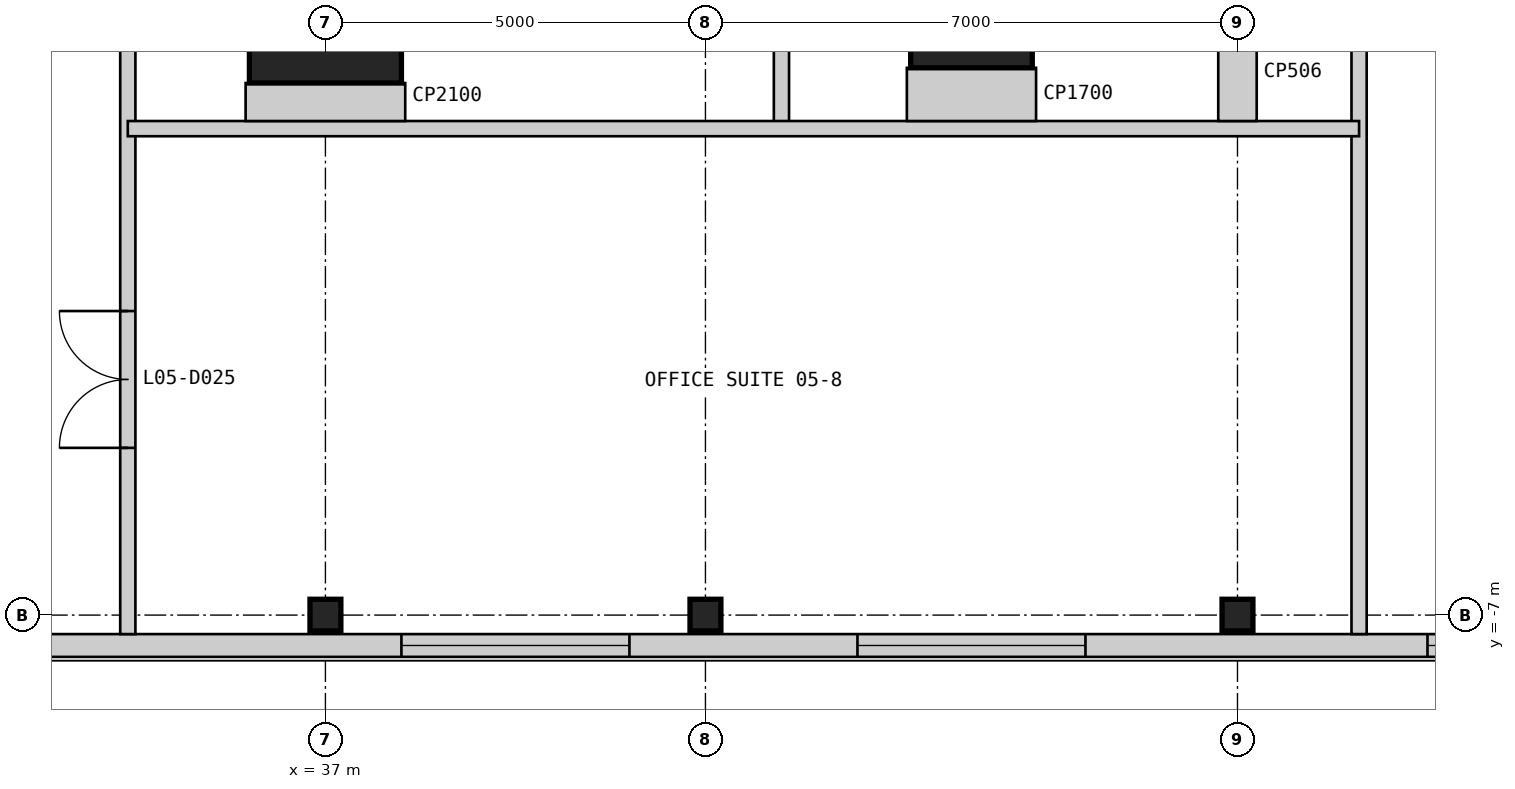
"""IFC4 building model, lengths in metres.
Left out: names, types, materials, properties, quantities, classifications, styles, units other than length and angle.
Written with IfcOpenShell. Run it as: python <this file> out.ifc"""

import sys

from ifc_helpers import new_model, si_unit, direction, frame, frame_2d, origin, origin_2d, place, context, subcontext, project, spatial, rectangle, i_section, extrude, element, fill, save


model = new_model("IFC4")
c1 = context("Model", 3, precision=1e-05, world=origin(), true_north=direction((0.0, 1.0)))
c2 = subcontext(c1, "Body", "Model", "MODEL_VIEW")
j1 = project(units=[si_unit("LENGTHUNIT", "METRE"), si_unit("PLANEANGLEUNIT", "RADIAN")], contexts=[c1])
p1 = place(None, origin())
s1 = spatial("IfcSite", under=j1, at=p1, CompositionType="ELEMENT")
p2 = place(p1, origin())
s2 = spatial("IfcBuilding", under=s1, at=p2, CompositionType="ELEMENT")
p3 = place(p2, frame((0.0, 0.0, 26.2)))
s3 = spatial("IfcBuildingStorey", under=s2, at=p3, CompositionType="ELEMENT", Elevation=26.2)
p4 = place(p3, frame((37.0, 1.0, 0.0), z_axis=(0.0, 0.0, 1.0), x_axis=(1.0, 0.0, 0.0)))
e1 = element("IfcColumn", 1, at=p4, inside=s3, PredefinedType="COLUMN", context=c2, shape_type="SweptSolid", body=[
    extrude(rectangle(XDim=2.0, YDim=2.0, at=origin_2d()), origin(), (0.0, 0.0, 1.0), 4.8),
])
p5 = place(p3, frame((45.5, 1.0, 0.0), z_axis=(0.0, 0.0, 1.0), x_axis=(1.0, 0.0, 0.0)))
e2 = element("IfcColumn", 2, at=p5, inside=s3, PredefinedType="COLUMN", context=c2, shape_type="SweptSolid", body=[
    extrude(rectangle(XDim=1.6, YDim=1.6, at=origin_2d()), origin(), (0.0, 0.0, 1.0), 4.8),
])
for number, where, z_axis, x_axis in (
    (3, (37.0, -7.0, 0.0), (0.0, 0.0, 1.0), (1.0, 0.0, 0.0)),
    (4, (42.0, -7.0, 0.0), (0.0, 0.0, 1.0), (1.0, 0.0, 0.0)),
    (5, (49.0, -7.0, 0.0), (0.0, 0.0, 1.0), (1.0, 0.0, 0.0)),
):
    element("IfcColumn", number, at=place(p3, frame(where, z_axis=z_axis, x_axis=x_axis)), inside=s3, PredefinedType="COLUMN", context=c2, shape_type="SweptSolid", body=[
        extrude(i_section(OverallWidth=0.406, OverallDepth=0.417, WebThickness=0.03, FlangeThickness=0.048, at=origin_2d()), origin(), (0.0, 0.0, 1.0), 4.8),
    ])
p6 = place(p3, frame((-7.55, -7.4, 0.0), z_axis=(0.0, 0.0, 1.0), x_axis=(1.0, 0.0, 0.0)))
e6 = element("IfcWall", 6, at=p6, inside=s3, PredefinedType="SOLIDWALL", context=c2, shape_type="SweptSolid", body=[
    extrude(rectangle(XDim=65.1, YDim=0.3, at=frame_2d((32.55, 0.0))), origin(), (0.0, 0.0, 1.0), 4.5),
])
p7 = place(p6, frame((3.05, 0.0, 0.9)))
e7 = element("IfcOpeningElement", 7, at=p7, cuts=e6, PredefinedType="OPENING", context=c2, shape_type="SweptSolid", body=[
    extrude(rectangle(XDim=3.0, YDim=2.4, at=frame_2d((1.5, 1.2))), frame((0.0, 0.16, 0.0), z_axis=(0.0, -1.0, 0.0), x_axis=(1.0, 0.0, 0.0)), (0.0, 0.0, 1.0), 0.32),
])
p8 = place(p6, frame((11.05, 0.0, 0.9)))
e8 = element("IfcOpeningElement", 8, at=p8, cuts=e6, PredefinedType="OPENING", context=c2, shape_type="SweptSolid", body=[
    extrude(rectangle(XDim=3.0, YDim=2.4, at=frame_2d((1.5, 1.2))), frame((0.0, 0.16, 0.0), z_axis=(0.0, -1.0, 0.0), x_axis=(1.0, 0.0, 0.0)), (0.0, 0.0, 1.0), 0.32),
])
p9 = place(p6, frame((25.05, 0.0, 0.9)))
e9 = element("IfcOpeningElement", 9, at=p9, cuts=e6, PredefinedType="OPENING", context=c2, shape_type="SweptSolid", body=[
    extrude(rectangle(XDim=3.0, YDim=2.4, at=frame_2d((1.5, 1.2))), frame((0.0, 0.16, 0.0), z_axis=(0.0, -1.0, 0.0), x_axis=(1.0, 0.0, 0.0)), (0.0, 0.0, 1.0), 0.32),
])
p10 = place(p6, frame((37.05, 0.0, 0.9)))
e10 = element("IfcOpeningElement", 10, at=p10, cuts=e6, PredefinedType="OPENING", context=c2, shape_type="SweptSolid", body=[
    extrude(rectangle(XDim=3.0, YDim=2.4, at=frame_2d((1.5, 1.2))), frame((0.0, 0.16, 0.0), z_axis=(0.0, -1.0, 0.0), x_axis=(1.0, 0.0, 0.0)), (0.0, 0.0, 1.0), 0.32),
])
p11 = place(p6, frame((45.55, 0.0, 0.9)))
e11 = element("IfcOpeningElement", 11, at=p11, cuts=e6, PredefinedType="OPENING", context=c2, shape_type="SweptSolid", body=[
    extrude(rectangle(XDim=3.0, YDim=2.4, at=frame_2d((1.5, 1.2))), frame((0.0, 0.16, 0.0), z_axis=(0.0, -1.0, 0.0), x_axis=(1.0, 0.0, 0.0)), (0.0, 0.0, 1.0), 0.32),
])
p12 = place(p6, frame((51.55, 0.0, 0.9)))
e12 = element("IfcOpeningElement", 12, at=p12, cuts=e6, PredefinedType="OPENING", context=c2, shape_type="SweptSolid", body=[
    extrude(rectangle(XDim=3.0, YDim=2.4, at=frame_2d((1.5, 1.2))), frame((0.0, 0.16, 0.0), z_axis=(0.0, -1.0, 0.0), x_axis=(1.0, 0.0, 0.0)), (0.0, 0.0, 1.0), 0.32),
])
p13 = place(p6, frame((59.05, 0.0, 0.9)))
e13 = element("IfcOpeningElement", 13, at=p13, cuts=e6, PredefinedType="OPENING", context=c2, shape_type="SweptSolid", body=[
    extrude(rectangle(XDim=3.0, YDim=2.4, at=frame_2d((1.5, 1.2))), frame((0.0, 0.16, 0.0), z_axis=(0.0, -1.0, 0.0), x_axis=(1.0, 0.0, 0.0)), (0.0, 0.0, 1.0), 0.32),
])
p14 = place(p3, frame((34.4, -7.25, 0.0), z_axis=(0.0, 0.0, 1.0), x_axis=(0.0, 1.0, 0.0)))
e14 = element("IfcWall", 14, at=p14, inside=s3, PredefinedType="PARTITIONING", context=c2, shape_type="SweptSolid", body=[
    extrude(rectangle(XDim=14.25, YDim=0.2, at=frame_2d((7.125, 0.0))), origin(), (0.0, 0.0, 1.0), 4.5),
])
p15 = place(p14, frame((2.45, 0.0, 0.0)))
e15 = element("IfcOpeningElement", 15, at=p15, cuts=e14, PredefinedType="OPENING", context=c2, shape_type="SweptSolid", body=[
    extrude(rectangle(XDim=1.8, YDim=2.4, at=frame_2d((0.9, 1.2))), frame((0.0, 0.11, 0.0), z_axis=(0.0, -1.0, 0.0), x_axis=(1.0, 0.0, 0.0)), (0.0, 0.0, 1.0), 0.22),
])
p16 = place(p14, frame((9.525, 0.0, 0.0)))
e16 = element("IfcOpeningElement", 16, at=p16, cuts=e14, PredefinedType="OPENING", context=c2, shape_type="SweptSolid", body=[
    extrude(rectangle(XDim=1.8, YDim=2.4, at=frame_2d((0.9, 1.2))), frame((0.0, 0.11, 0.0), z_axis=(0.0, -1.0, 0.0), x_axis=(1.0, 0.0, 0.0)), (0.0, 0.0, 1.0), 0.22),
])
p17 = place(p3, frame((43.0, -0.6, 0.0), z_axis=(0.0, 0.0, 1.0), x_axis=(0.0, 1.0, 0.0)))
e17 = element("IfcWall", 17, at=p17, inside=s3, PredefinedType="PARTITIONING", context=c2, shape_type="SweptSolid", body=[
    extrude(rectangle(XDim=28.6, YDim=0.2, at=frame_2d((14.3, 0.0))), origin(), (0.0, 0.0, 1.0), 3.893),
])
p18 = place(p3, frame((50.6, -7.25, 0.0), z_axis=(0.0, 0.0, 1.0), x_axis=(0.0, 1.0, 0.0)))
e18 = element("IfcWall", 18, at=p18, inside=s3, PredefinedType="PARTITIONING", context=c2, shape_type="SweptSolid", body=[
    extrude(rectangle(XDim=22.85, YDim=0.2, at=frame_2d((11.425, 0.0))), origin(), (0.0, 0.0, 1.0), 4.5),
])
p19 = place(p3, frame((34.4, -0.6, 0.0), z_axis=(0.0, 0.0, 1.0), x_axis=(1.0, 0.0, 0.0)))
e19 = element("IfcWall", 19, at=p19, inside=s3, PredefinedType="PARTITIONING", context=c2, shape_type="SweptSolid", body=[
    extrude(rectangle(XDim=16.2, YDim=0.2, at=frame_2d((8.1, 0.0))), origin(), (0.0, 0.0, 1.0), 4.5),
])
p20 = place(p3, frame((37.0, -0.5, 0.0), z_axis=(0.0, 0.0, 1.0), x_axis=(0.0, 1.0, 0.0)))
e20 = element("IfcWall", 20, at=p20, inside=s3, PredefinedType="PARTITIONING", context=c2, shape_type="SweptSolid", body=[
    extrude(rectangle(XDim=0.5, YDim=2.1, at=frame_2d((0.25, 0.0))), origin(), (0.0, 0.0, 1.0), 4.5),
])
p21 = place(p3, frame((45.5, -0.5, 0.0), z_axis=(0.0, 0.0, 1.0), x_axis=(0.0, 1.0, 0.0)))
e21 = element("IfcWall", 21, at=p21, inside=s3, PredefinedType="PARTITIONING", context=c2, shape_type="SweptSolid", body=[
    extrude(rectangle(XDim=0.7, YDim=1.7, at=frame_2d((0.35, 0.0))), origin(), (0.0, 0.0, 1.0), 4.5),
])
p22 = place(p3, frame((49.0, -0.5, 0.0), z_axis=(0.0, 0.0, 1.0), x_axis=(0.0, 1.0, 0.0)))
e22 = element("IfcWall", 22, at=p22, inside=s3, PredefinedType="PARTITIONING", context=c2, shape_type="SweptSolid", body=[
    extrude(rectangle(XDim=1.292, YDim=0.506, at=frame_2d((0.646, 0.0))), origin(), (0.0, 0.0, 1.0), 3.654),
])
p23 = place(p11, origin())
e23 = element("IfcWindow", 23, at=p23, inside=s3, PartitioningType="SINGLE_PANEL", PredefinedType="WINDOW", context=c2, shape_type="SweptSolid", body=[
    extrude(rectangle(XDim=3.0, YDim=2.4, at=frame_2d((1.5, 1.2))), frame((0.0, 0.03, 0.0), z_axis=(0.0, -1.0, 0.0), x_axis=(1.0, 0.0, 0.0)), (0.0, 0.0, 1.0), 0.06),
])
fill(e11, e23)
p24 = place(p12, origin())
e24 = element("IfcWindow", 24, at=p24, inside=s3, PartitioningType="SINGLE_PANEL", PredefinedType="WINDOW", context=c2, shape_type="SweptSolid", body=[
    extrude(rectangle(XDim=3.0, YDim=2.4, at=frame_2d((1.5, 1.2))), frame((0.0, 0.03, 0.0), z_axis=(0.0, -1.0, 0.0), x_axis=(1.0, 0.0, 0.0)), (0.0, 0.0, 1.0), 0.06),
])
fill(e12, e24)
p25 = place(p13, origin())
e25 = element("IfcWindow", 25, at=p25, inside=s3, PartitioningType="SINGLE_PANEL", PredefinedType="WINDOW", context=c2, shape_type="SweptSolid", body=[
    extrude(rectangle(XDim=3.0, YDim=2.4, at=frame_2d((1.5, 1.2))), frame((0.0, 0.03, 0.0), z_axis=(0.0, -1.0, 0.0), x_axis=(1.0, 0.0, 0.0)), (0.0, 0.0, 1.0), 0.06),
])
fill(e13, e25)
p26 = place(p15, origin())
e26 = element("IfcDoor", 26, at=p26, inside=s3, OperationType="DOUBLE_DOOR_SINGLE_SWING", PredefinedType="DOOR", context=c2, shape_type="SweptSolid", body=[
    extrude(rectangle(XDim=1.8, YDim=2.4, at=frame_2d((0.9, 1.2))), frame((0.0, 0.025, 0.0), z_axis=(0.0, -1.0, 0.0), x_axis=(1.0, 0.0, 0.0)), (0.0, 0.0, 1.0), 0.05),
])
fill(e15, e26)
save(model, sys.argv[1])
